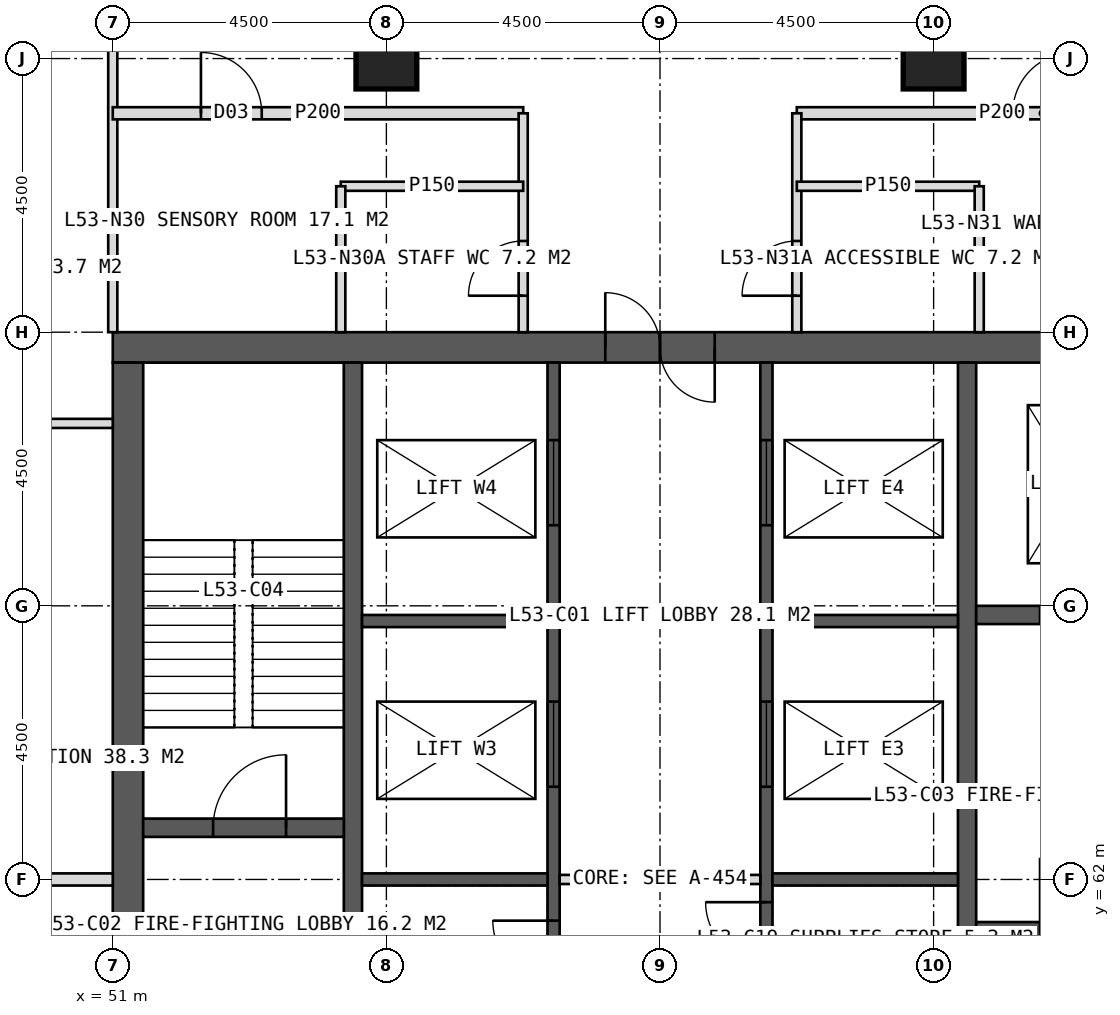
"""IFC4 building model, lengths in metres.
Left out: names, types, materials, properties, quantities, classifications, styles, units other than length and angle.
Written with IfcOpenShell. Run it as: python <this file> out.ifc"""

import sys

from ifc_helpers import new_model, si_unit, direction, frame, frame_2d, origin, origin_2d, place, context, subcontext, project, spatial, rectangle, hollow_rectangle, extrude, element, fill, save


model = new_model("IFC4")
c1 = context("Model", 3, precision=1e-05, world=origin(), true_north=direction((0.0, 1.0)))
c2 = subcontext(c1, "Body", "Model", "MODEL_VIEW")
j1 = project(units=[si_unit("LENGTHUNIT", "METRE"), si_unit("PLANEANGLEUNIT", "RADIAN")], contexts=[c1])
p1 = place(None, origin())
s1 = spatial("IfcSite", under=j1, at=p1, CompositionType="ELEMENT")
p2 = place(p1, origin())
s2 = spatial("IfcBuilding", under=s1, at=p2, CompositionType="ELEMENT")
p3 = place(p2, frame((0.0, 0.0, 221.0)))
s3 = spatial("IfcBuildingStorey", under=s2, at=p3, CompositionType="ELEMENT", Elevation=221.0)
p4 = place(p3, frame((51.0, 70.75, 0.0), z_axis=(0.0, 0.0, 1.0), x_axis=(1.0, 0.0, 0.0)))
e1 = element("IfcWall", 1, at=p4, inside=s3, PredefinedType="SHEAR", context=c2, shape_type="SweptSolid", body=[
    extrude(rectangle(XDim=18.0, YDim=0.5, at=frame_2d((9.0, 0.0))), origin(), (0.0, 0.0, 1.0), 4.0),
])
p5 = place(p4, frame((8.1, 0.0, 0.0)))
e2 = element("IfcOpeningElement", 2, at=p5, cuts=e1, PredefinedType="OPENING", context=c2, shape_type="SweptSolid", body=[
    extrude(rectangle(XDim=1.8, YDim=2.2, at=frame_2d((0.9, 1.1))), frame((0.0, 0.26, 0.0), z_axis=(0.0, -1.0, 0.0), x_axis=(1.0, 0.0, 0.0)), (0.0, 0.0, 1.0), 0.52),
])
p6 = place(p3, frame((51.25, 53.5, 0.0), z_axis=(0.0, 0.0, 1.0), x_axis=(0.0, 1.0, 0.0)))
e3 = element("IfcWall", 3, at=p6, inside=s3, PredefinedType="SHEAR", context=c2, shape_type="SweptSolid", body=[
    extrude(rectangle(XDim=17.0, YDim=0.5, at=frame_2d((8.5, 0.0))), origin(), (0.0, 0.0, 1.0), 4.0),
])
p7 = place(p6, frame((6.1, 0.0, 0.0)))
e4 = element("IfcOpeningElement", 4, at=p7, cuts=e3, PredefinedType="OPENING", context=c2, shape_type="SweptSolid", body=[
    extrude(rectangle(XDim=1.5, YDim=2.2, at=frame_2d((0.75, 1.1))), frame((0.0, 0.26, 0.0), z_axis=(0.0, -1.0, 0.0), x_axis=(1.0, 0.0, 0.0)), (0.0, 0.0, 1.0), 0.52),
])
for number, where, z_axis, x_axis in (
    (5, (54.95, 53.5, 0.0), (0.0, 0.0, 1.0), (0.0, 1.0, 0.0)),
    (6, (65.05, 53.5, 0.0), (0.0, 0.0, 1.0), (0.0, 1.0, 0.0)),
):
    element("IfcWall", number, at=place(p3, frame(where, z_axis=z_axis, x_axis=x_axis)), inside=s3, PredefinedType="SHEAR", context=c2, shape_type="SweptSolid", body=[
        extrude(rectangle(XDim=17.0, YDim=0.3, at=frame_2d((8.5, 0.0))), origin(), (0.0, 0.0, 1.0), 4.0),
    ])
p8 = place(p3, frame((58.25, 53.5, 0.0), z_axis=(0.0, 0.0, 1.0), x_axis=(0.0, 1.0, 0.0)))
e7 = element("IfcWall", 7, at=p8, inside=s3, PredefinedType="SHEAR", context=c2, shape_type="SweptSolid", body=[
    extrude(rectangle(XDim=17.0, YDim=0.2, at=frame_2d((8.5, 0.0))), origin(), (0.0, 0.0, 1.0), 4.0),
])
p9 = place(p8, frame((0.808, 0.0, 0.0)))
e8 = element("IfcOpeningElement", 8, at=p9, cuts=e7, PredefinedType="OPENING", context=c2, shape_type="SweptSolid", body=[
    extrude(rectangle(XDim=1.0, YDim=2.1, at=frame_2d((0.5, 1.05))), frame((0.0, 0.11, 0.0), z_axis=(0.0, -1.0, 0.0), x_axis=(1.0, 0.0, 0.0)), (0.0, 0.0, 1.0), 0.22),
])
p10 = place(p8, frame((2.958, 0.0, 0.0)))
e9 = element("IfcOpeningElement", 9, at=p10, cuts=e7, PredefinedType="OPENING", context=c2, shape_type="SweptSolid", body=[
    extrude(rectangle(XDim=1.0, YDim=2.1, at=frame_2d((0.5, 1.05))), frame((0.0, 0.11, 0.0), z_axis=(0.0, -1.0, 0.0), x_axis=(1.0, 0.0, 0.0)), (0.0, 0.0, 1.0), 0.22),
])
p11 = place(p8, frame((4.722, 0.0, 0.0)))
e10 = element("IfcOpeningElement", 10, at=p11, cuts=e7, PredefinedType="OPENING", context=c2, shape_type="SweptSolid", body=[
    extrude(rectangle(XDim=1.0, YDim=2.1, at=frame_2d((0.5, 1.05))), frame((0.0, 0.11, 0.0), z_axis=(0.0, -1.0, 0.0), x_axis=(1.0, 0.0, 0.0)), (0.0, 0.0, 1.0), 0.22),
])
p12 = place(p8, frame((6.823, 0.0, 0.0)))
e11 = element("IfcOpeningElement", 11, at=p12, cuts=e7, PredefinedType="OPENING", context=c2, shape_type="SweptSolid", body=[
    extrude(rectangle(XDim=1.0, YDim=2.1, at=frame_2d((0.5, 1.05))), frame((0.0, 0.11, 0.0), z_axis=(0.0, -1.0, 0.0), x_axis=(1.0, 0.0, 0.0)), (0.0, 0.0, 1.0), 0.22),
])
p13 = place(p8, frame((10.025, 0.0, 0.0)))
e12 = element("IfcOpeningElement", 12, at=p13, cuts=e7, PredefinedType="OPENING", context=c2, shape_type="SweptSolid", body=[
    extrude(rectangle(XDim=1.4, YDim=2.2, at=frame_2d((0.7, 1.1))), frame((0.0, 0.11, 0.0), z_axis=(0.0, -1.0, 0.0), x_axis=(1.0, 0.0, 0.0)), (0.0, 0.0, 1.0), 0.22),
])
p14 = place(p8, frame((14.325, 0.0, 0.0)))
e13 = element("IfcOpeningElement", 13, at=p14, cuts=e7, PredefinedType="OPENING", context=c2, shape_type="SweptSolid", body=[
    extrude(rectangle(XDim=1.4, YDim=2.2, at=frame_2d((0.7, 1.1))), frame((0.0, 0.11, 0.0), z_axis=(0.0, -1.0, 0.0), x_axis=(1.0, 0.0, 0.0)), (0.0, 0.0, 1.0), 0.22),
])
p15 = place(p3, frame((61.75, 53.5, 0.0), z_axis=(0.0, 0.0, 1.0), x_axis=(0.0, 1.0, 0.0)))
e14 = element("IfcWall", 14, at=p15, inside=s3, PredefinedType="SHEAR", context=c2, shape_type="SweptSolid", body=[
    extrude(rectangle(XDim=17.0, YDim=0.2, at=frame_2d((8.5, 0.0))), origin(), (0.0, 0.0, 1.0), 4.0),
])
p16 = place(p15, frame((0.496, 0.0, 0.0)))
e15 = element("IfcOpeningElement", 15, at=p16, cuts=e14, PredefinedType="OPENING", context=c2, shape_type="SweptSolid", body=[
    extrude(rectangle(XDim=1.0, YDim=2.1, at=frame_2d((0.5, 1.05))), frame((0.0, 0.11, 0.0), z_axis=(0.0, -1.0, 0.0), x_axis=(1.0, 0.0, 0.0)), (0.0, 0.0, 1.0), 0.22),
])
p17 = place(p15, frame((2.646, 0.0, 0.0)))
e16 = element("IfcOpeningElement", 16, at=p17, cuts=e14, PredefinedType="OPENING", context=c2, shape_type="SweptSolid", body=[
    extrude(rectangle(XDim=1.0, YDim=2.1, at=frame_2d((0.5, 1.05))), frame((0.0, 0.11, 0.0), z_axis=(0.0, -1.0, 0.0), x_axis=(1.0, 0.0, 0.0)), (0.0, 0.0, 1.0), 0.22),
])
p18 = place(p15, frame((5.027, 0.0, 0.0)))
e17 = element("IfcOpeningElement", 17, at=p18, cuts=e14, PredefinedType="OPENING", context=c2, shape_type="SweptSolid", body=[
    extrude(rectangle(XDim=1.0, YDim=2.1, at=frame_2d((0.5, 1.05))), frame((0.0, 0.11, 0.0), z_axis=(0.0, -1.0, 0.0), x_axis=(1.0, 0.0, 0.0)), (0.0, 0.0, 1.0), 0.22),
])
p19 = place(p15, frame((7.126, 0.0, 0.0)))
e18 = element("IfcOpeningElement", 18, at=p19, cuts=e14, PredefinedType="OPENING", context=c2, shape_type="SweptSolid", body=[
    extrude(rectangle(XDim=1.0, YDim=2.1, at=frame_2d((0.5, 1.05))), frame((0.0, 0.11, 0.0), z_axis=(0.0, -1.0, 0.0), x_axis=(1.0, 0.0, 0.0)), (0.0, 0.0, 1.0), 0.22),
])
p20 = place(p15, frame((10.025, 0.0, 0.0)))
e19 = element("IfcOpeningElement", 19, at=p20, cuts=e14, PredefinedType="OPENING", context=c2, shape_type="SweptSolid", body=[
    extrude(rectangle(XDim=1.4, YDim=2.2, at=frame_2d((0.7, 1.1))), frame((0.0, 0.11, 0.0), z_axis=(0.0, -1.0, 0.0), x_axis=(1.0, 0.0, 0.0)), (0.0, 0.0, 1.0), 0.22),
])
p21 = place(p15, frame((14.325, 0.0, 0.0)))
e20 = element("IfcOpeningElement", 20, at=p21, cuts=e14, PredefinedType="OPENING", context=c2, shape_type="SweptSolid", body=[
    extrude(rectangle(XDim=1.4, YDim=2.2, at=frame_2d((0.7, 1.1))), frame((0.0, 0.11, 0.0), z_axis=(0.0, -1.0, 0.0), x_axis=(1.0, 0.0, 0.0)), (0.0, 0.0, 1.0), 0.22),
])
for number, where, z_axis, x_axis in (
    (21, (55.1, 62.0, 0.0), (0.0, 0.0, 1.0), (1.0, 0.0, 0.0)),
    (22, (61.85, 62.0, 0.0), (0.0, 0.0, 1.0), (1.0, 0.0, 0.0)),
    (23, (55.1, 66.25, 0.0), (0.0, 0.0, 1.0), (1.0, 0.0, 0.0)),
    (24, (61.85, 66.25, 0.0), (0.0, 0.0, 1.0), (1.0, 0.0, 0.0)),
):
    element("IfcWall", number, at=place(p3, frame(where, z_axis=z_axis, x_axis=x_axis)), inside=s3, PredefinedType="SHEAR", context=c2, shape_type="SweptSolid", body=[
        extrude(rectangle(XDim=3.05, YDim=0.2, at=frame_2d((1.525, 0.0))), origin(), (0.0, 0.0, 1.0), 4.0),
    ])
p22 = place(p3, frame((51.5, 62.85, 0.0), z_axis=(0.0, 0.0, 1.0), x_axis=(1.0, 0.0, 0.0)))
e25 = element("IfcWall", 25, at=p22, inside=s3, PredefinedType="SHEAR", context=c2, shape_type="SweptSolid", body=[
    extrude(rectangle(XDim=3.3, YDim=0.3, at=frame_2d((1.65, 0.0))), origin(), (0.0, 0.0, 1.0), 4.0),
])
p23 = place(p22, frame((1.15, 0.0, 0.0)))
e26 = element("IfcOpeningElement", 26, at=p23, cuts=e25, PredefinedType="OPENING", context=c2, shape_type="SweptSolid", body=[
    extrude(rectangle(XDim=1.2, YDim=2.1, at=frame_2d((0.6, 1.05))), frame((0.0, 0.16, 0.0), z_axis=(0.0, -1.0, 0.0), x_axis=(1.0, 0.0, 0.0)), (0.0, 0.0, 1.0), 0.32),
])
p24 = place(p3, frame((65.2, 61.15, 0.0), z_axis=(0.0, 0.0, 1.0), x_axis=(1.0, 0.0, 0.0)))
e27 = element("IfcWall", 27, at=p24, inside=s3, PredefinedType="SHEAR", context=c2, shape_type="SweptSolid", body=[
    extrude(rectangle(XDim=3.3, YDim=0.3, at=frame_2d((1.65, 0.0))), origin(), (0.0, 0.0, 1.0), 4.0),
])
p25 = place(p24, frame((1.05, 0.0, 0.0)))
e28 = element("IfcOpeningElement", 28, at=p25, cuts=e27, PredefinedType="OPENING", context=c2, shape_type="SweptSolid", body=[
    extrude(rectangle(XDim=1.2, YDim=2.1, at=frame_2d((0.6, 1.05))), frame((0.0, 0.16, 0.0), z_axis=(0.0, -1.0, 0.0), x_axis=(1.0, 0.0, 0.0)), (0.0, 0.0, 1.0), 0.32),
])
p26 = place(p3, frame((65.2, 66.35, 0.0), z_axis=(0.0, 0.0, 1.0), x_axis=(1.0, 0.0, 0.0)))
e29 = element("IfcWall", 29, at=p26, inside=s3, PredefinedType="SHEAR", context=c2, shape_type="SweptSolid", body=[
    extrude(rectangle(XDim=3.3, YDim=0.3, at=frame_2d((1.65, 0.0))), origin(), (0.0, 0.0, 1.0), 4.0),
])
p27 = place(p26, frame((1.05, 0.0, 0.0)))
e30 = element("IfcOpeningElement", 30, at=p27, cuts=e29, PredefinedType="OPENING", context=c2, shape_type="SweptSolid", body=[
    extrude(rectangle(XDim=1.2, YDim=2.2, at=frame_2d((0.6, 1.1))), frame((0.0, 0.16, 0.0), z_axis=(0.0, -1.0, 0.0), x_axis=(1.0, 0.0, 0.0)), (0.0, 0.0, 1.0), 0.32),
])
for number, where, z_axis, x_axis in (
    (31, (55.5, 75.5, 0.0), (0.0, 0.0, 1.0), (1.0, 0.0, 0.0)),
    (32, (64.5, 75.5, 0.0), (0.0, 0.0, 1.0), (1.0, 0.0, 0.0)),
):
    element("IfcColumn", number, at=place(p3, frame(where, z_axis=z_axis, x_axis=x_axis)), inside=s3, PredefinedType="COLUMN", context=c2, shape_type="SweptSolid", body=[
        extrude(hollow_rectangle(XDim=1.0, YDim=1.0, WallThickness=0.1, at=origin_2d()), origin(), (0.0, 0.0, 1.0), 4.0),
    ])
p28 = place(p3, frame((51.0, 71.0, 0.0), z_axis=(0.0, 0.0, 1.0), x_axis=(0.0, 1.0, 0.0)))
e33 = element("IfcWall", 33, at=p28, inside=s3, PredefinedType="PARTITIONING", context=c2, shape_type="SweptSolid", body=[
    extrude(rectangle(XDim=5.1, YDim=0.15, at=frame_2d((2.55, 0.0))), origin(), (0.0, 0.0, 1.0), 3.75),
])
p29 = place(p3, frame((51.0, 74.6, 0.0), z_axis=(0.0, 0.0, 1.0), x_axis=(1.0, 0.0, 0.0)))
e34 = element("IfcWall", 34, at=p29, inside=s3, PredefinedType="PARTITIONING", context=c2, shape_type="SweptSolid", body=[
    extrude(rectangle(XDim=6.75, YDim=0.2, at=frame_2d((3.375, 0.0))), origin(), (0.0, 0.0, 1.0), 3.75),
])
p30 = place(p29, frame((1.45, 0.0, 0.0)))
e35 = element("IfcOpeningElement", 35, at=p30, cuts=e34, PredefinedType="OPENING", context=c2, shape_type="SweptSolid", body=[
    extrude(rectangle(XDim=1.0, YDim=2.1, at=frame_2d((0.5, 1.05))), frame((0.0, 0.11, 0.0), z_axis=(0.0, -1.0, 0.0), x_axis=(1.0, 0.0, 0.0)), (0.0, 0.0, 1.0), 0.22),
])
p31 = place(p3, frame((62.25, 74.6, 0.0), z_axis=(0.0, 0.0, 1.0), x_axis=(1.0, 0.0, 0.0)))
e36 = element("IfcWall", 36, at=p31, inside=s3, PredefinedType="PARTITIONING", context=c2, shape_type="SweptSolid", body=[
    extrude(rectangle(XDim=6.75, YDim=0.2, at=frame_2d((3.375, 0.0))), origin(), (0.0, 0.0, 1.0), 3.75),
])
p32 = place(p31, frame((3.55, 0.0, 0.0)))
e37 = element("IfcOpeningElement", 37, at=p32, cuts=e36, PredefinedType="OPENING", context=c2, shape_type="SweptSolid", body=[
    extrude(rectangle(XDim=1.0, YDim=2.1, at=frame_2d((0.5, 1.05))), frame((0.0, 0.11, 0.0), z_axis=(0.0, -1.0, 0.0), x_axis=(1.0, 0.0, 0.0)), (0.0, 0.0, 1.0), 0.22),
])
p33 = place(p3, frame((57.75, 71.0, 0.0), z_axis=(0.0, 0.0, 1.0), x_axis=(0.0, 1.0, 0.0)))
e38 = element("IfcWall", 38, at=p33, inside=s3, PredefinedType="PARTITIONING", context=c2, shape_type="SweptSolid", body=[
    extrude(rectangle(XDim=3.6, YDim=0.15, at=frame_2d((1.8, 0.0))), origin(), (0.0, 0.0, 1.0), 3.75),
])
p34 = place(p33, frame((0.6, 0.0, 0.0)))
e39 = element("IfcOpeningElement", 39, at=p34, cuts=e38, PredefinedType="OPENING", context=c2, shape_type="SweptSolid", body=[
    extrude(rectangle(XDim=0.9, YDim=2.1, at=frame_2d((0.45, 1.05))), frame((0.0, 0.085, 0.0), z_axis=(0.0, -1.0, 0.0), x_axis=(1.0, 0.0, 0.0)), (0.0, 0.0, 1.0), 0.17),
])
p35 = place(p3, frame((62.25, 71.0, 0.0), z_axis=(0.0, 0.0, 1.0), x_axis=(0.0, 1.0, 0.0)))
e40 = element("IfcWall", 40, at=p35, inside=s3, PredefinedType="PARTITIONING", context=c2, shape_type="SweptSolid", body=[
    extrude(rectangle(XDim=3.6, YDim=0.15, at=frame_2d((1.8, 0.0))), origin(), (0.0, 0.0, 1.0), 3.75),
])
p36 = place(p35, frame((0.6, 0.0, 0.0)))
e41 = element("IfcOpeningElement", 41, at=p36, cuts=e40, PredefinedType="OPENING", context=c2, shape_type="SweptSolid", body=[
    extrude(rectangle(XDim=0.9, YDim=2.1, at=frame_2d((0.45, 1.05))), frame((0.0, 0.085, 0.0), z_axis=(0.0, -1.0, 0.0), x_axis=(1.0, 0.0, 0.0)), (0.0, 0.0, 1.0), 0.17),
])
p37 = place(p3, frame((54.75, 73.4, 0.0), z_axis=(0.0, 0.0, 1.0), x_axis=(1.0, 0.0, 0.0)))
e42 = element("IfcWall", 42, at=p37, inside=s3, PredefinedType="PARTITIONING", context=c2, shape_type="SweptSolid", body=[
    extrude(rectangle(XDim=3.0, YDim=0.15, at=frame_2d((1.5, 0.0))), origin(), (0.0, 0.0, 1.0), 3.75),
])
p38 = place(p3, frame((54.75, 71.0, 0.0), z_axis=(0.0, 0.0, 1.0), x_axis=(0.0, 1.0, 0.0)))
e43 = element("IfcWall", 43, at=p38, inside=s3, PredefinedType="PARTITIONING", context=c2, shape_type="SweptSolid", body=[
    extrude(rectangle(XDim=2.4, YDim=0.15, at=frame_2d((1.2, 0.0))), origin(), (0.0, 0.0, 1.0), 3.75),
])
p39 = place(p3, frame((62.25, 73.4, 0.0), z_axis=(0.0, 0.0, 1.0), x_axis=(1.0, 0.0, 0.0)))
e44 = element("IfcWall", 44, at=p39, inside=s3, PredefinedType="PARTITIONING", context=c2, shape_type="SweptSolid", body=[
    extrude(rectangle(XDim=3.0, YDim=0.15, at=frame_2d((1.5, 0.0))), origin(), (0.0, 0.0, 1.0), 3.75),
])
p40 = place(p3, frame((65.25, 71.0, 0.0), z_axis=(0.0, 0.0, 1.0), x_axis=(0.0, 1.0, 0.0)))
e45 = element("IfcWall", 45, at=p40, inside=s3, PredefinedType="PARTITIONING", context=c2, shape_type="SweptSolid", body=[
    extrude(rectangle(XDim=2.4, YDim=0.15, at=frame_2d((1.2, 0.0))), origin(), (0.0, 0.0, 1.0), 3.75),
])
p41 = place(p3, frame((51.0, 62.0, 0.0), z_axis=(0.0, 0.0, 1.0), x_axis=(-1.0, 0.0, 0.0)))
e46 = element("IfcWall", 46, at=p41, inside=s3, PredefinedType="SOLIDWALL", context=c2, shape_type="SweptSolid", body=[
    extrude(rectangle(XDim=5.1, YDim=0.2, at=frame_2d((2.55, 0.0))), origin(), (0.0, 0.0, 1.0), 2.95),
])
p42 = place(p3, frame((51.0, 69.5, 0.0), z_axis=(0.0, 0.0, 1.0), x_axis=(-1.0, 0.0, 0.0)))
e47 = element("IfcWall", 47, at=p42, inside=s3, PredefinedType="PARTITIONING", context=c2, shape_type="SweptSolid", body=[
    extrude(rectangle(XDim=5.1, YDim=0.15, at=frame_2d((2.55, 0.0))), origin(), (0.0, 0.0, 1.0), 3.75),
])
p43 = place(p3, frame((58.35, 62.0, 0.0), z_axis=(0.0, 0.0, 1.0), x_axis=(1.0, 0.0, 0.0)))
e48 = element("IfcWall", 48, at=p43, inside=s3, PredefinedType="PARTITIONING", context=c2, shape_type="SweptSolid", body=[
    extrude(rectangle(XDim=3.3, YDim=0.15, at=frame_2d((1.65, 0.0))), origin(), (0.0, 0.0, 1.0), 3.75),
])
p44 = place(p34, origin())
e49 = element("IfcDoor", 49, at=p44, inside=s3, OperationType="SINGLE_SWING_LEFT", PredefinedType="DOOR", context=c2, shape_type="SweptSolid", body=[
    extrude(rectangle(XDim=0.9, YDim=2.1, at=frame_2d((0.45, 1.05))), frame((0.0, 0.025, 0.0), z_axis=(0.0, -1.0, 0.0), x_axis=(1.0, 0.0, 0.0)), (0.0, 0.0, 1.0), 0.05),
])
fill(e39, e49)
p45 = place(p30, origin())
e50 = element("IfcDoor", 50, at=p45, inside=s3, OperationType="SINGLE_SWING_LEFT", PredefinedType="DOOR", context=c2, shape_type="SweptSolid", body=[
    extrude(rectangle(XDim=1.0, YDim=2.1, at=frame_2d((0.5, 1.05))), frame((0.0, 0.025, 0.0), z_axis=(0.0, -1.0, 0.0), x_axis=(1.0, 0.0, 0.0)), (0.0, 0.0, 1.0), 0.05),
])
fill(e35, e50)
p46 = place(p36, origin())
e51 = element("IfcDoor", 51, at=p46, inside=s3, OperationType="SINGLE_SWING_LEFT", PredefinedType="DOOR", context=c2, shape_type="SweptSolid", body=[
    extrude(rectangle(XDim=0.9, YDim=2.1, at=frame_2d((0.45, 1.05))), frame((0.0, 0.025, 0.0), z_axis=(0.0, -1.0, 0.0), x_axis=(1.0, 0.0, 0.0)), (0.0, 0.0, 1.0), 0.05),
])
fill(e41, e51)
p47 = place(p32, origin())
e52 = element("IfcDoor", 52, at=p47, inside=s3, OperationType="SINGLE_SWING_RIGHT", PredefinedType="DOOR", context=c2, shape_type="SweptSolid", body=[
    extrude(rectangle(XDim=1.0, YDim=2.1, at=frame_2d((0.5, 1.05))), frame((0.0, 0.025, 0.0), z_axis=(0.0, -1.0, 0.0), x_axis=(1.0, 0.0, 0.0)), (0.0, 0.0, 1.0), 0.05),
])
fill(e37, e52)
p48 = place(p5, origin())
e53 = element("IfcDoor", 53, at=p48, inside=s3, OperationType="DOUBLE_DOOR_SINGLE_SWING", PredefinedType="DOOR", context=c2, shape_type="SweptSolid", body=[
    extrude(rectangle(XDim=1.8, YDim=2.2, at=frame_2d((0.9, 1.1))), frame((0.0, 0.025, 0.0), z_axis=(0.0, -1.0, 0.0), x_axis=(1.0, 0.0, 0.0)), (0.0, 0.0, 1.0), 0.05),
])
fill(e2, e53)
p49 = place(p7, origin())
e54 = element("IfcDoor", 54, at=p49, inside=s3, OperationType="DOUBLE_DOOR_SINGLE_SWING", PredefinedType="DOOR", context=c2, shape_type="SweptSolid", body=[
    extrude(rectangle(XDim=1.5, YDim=2.2, at=frame_2d((0.75, 1.1))), frame((0.0, 0.025, 0.0), z_axis=(0.0, -1.0, 0.0), x_axis=(1.0, 0.0, 0.0)), (0.0, 0.0, 1.0), 0.05),
])
fill(e4, e54)
p50 = place(p23, origin())
e55 = element("IfcDoor", 55, at=p50, inside=s3, OperationType="SINGLE_SWING_RIGHT", PredefinedType="DOOR", context=c2, shape_type="SweptSolid", body=[
    extrude(rectangle(XDim=1.2, YDim=2.1, at=frame_2d((0.6, 1.05))), frame((0.0, 0.025, 0.0), z_axis=(0.0, -1.0, 0.0), x_axis=(1.0, 0.0, 0.0)), (0.0, 0.0, 1.0), 0.05),
])
fill(e26, e55)
p51 = place(p12, origin())
e56 = element("IfcDoor", 56, at=p51, inside=s3, OperationType="SINGLE_SWING_RIGHT", PredefinedType="DOOR", context=c2, shape_type="SweptSolid", body=[
    extrude(rectangle(XDim=1.0, YDim=2.1, at=frame_2d((0.5, 1.05))), frame((0.0, 0.025, 0.0), z_axis=(0.0, -1.0, 0.0), x_axis=(1.0, 0.0, 0.0)), (0.0, 0.0, 1.0), 0.05),
])
fill(e11, e56)
p52 = place(p19, origin())
e57 = element("IfcDoor", 57, at=p52, inside=s3, OperationType="SINGLE_SWING_RIGHT", PredefinedType="DOOR", context=c2, shape_type="SweptSolid", body=[
    extrude(rectangle(XDim=1.0, YDim=2.1, at=frame_2d((0.5, 1.05))), frame((0.0, 0.025, 0.0), z_axis=(0.0, -1.0, 0.0), x_axis=(1.0, 0.0, 0.0)), (0.0, 0.0, 1.0), 0.05),
])
fill(e18, e57)
p53 = place(p13, origin())
e58 = element("IfcDoor", 58, at=p53, inside=s3, OperationType="SLIDING_TO_LEFT", PredefinedType="DOOR", context=c2, shape_type="SweptSolid", body=[
    extrude(rectangle(XDim=1.4, YDim=2.2, at=frame_2d((0.7, 1.1))), frame((0.0, 0.025, 0.0), z_axis=(0.0, -1.0, 0.0), x_axis=(1.0, 0.0, 0.0)), (0.0, 0.0, 1.0), 0.05),
])
fill(e12, e58)
p54 = place(p20, origin())
e59 = element("IfcDoor", 59, at=p54, inside=s3, OperationType="SLIDING_TO_LEFT", PredefinedType="DOOR", context=c2, shape_type="SweptSolid", body=[
    extrude(rectangle(XDim=1.4, YDim=2.2, at=frame_2d((0.7, 1.1))), frame((0.0, 0.025, 0.0), z_axis=(0.0, -1.0, 0.0), x_axis=(1.0, 0.0, 0.0)), (0.0, 0.0, 1.0), 0.05),
])
fill(e19, e59)
p55 = place(p14, origin())
e60 = element("IfcDoor", 60, at=p55, inside=s3, OperationType="SLIDING_TO_LEFT", PredefinedType="DOOR", context=c2, shape_type="SweptSolid", body=[
    extrude(rectangle(XDim=1.4, YDim=2.2, at=frame_2d((0.7, 1.1))), frame((0.0, 0.025, 0.0), z_axis=(0.0, -1.0, 0.0), x_axis=(1.0, 0.0, 0.0)), (0.0, 0.0, 1.0), 0.05),
])
fill(e13, e60)
p56 = place(p21, origin())
e61 = element("IfcDoor", 61, at=p56, inside=s3, OperationType="SLIDING_TO_LEFT", PredefinedType="DOOR", context=c2, shape_type="SweptSolid", body=[
    extrude(rectangle(XDim=1.4, YDim=2.2, at=frame_2d((0.7, 1.1))), frame((0.0, 0.025, 0.0), z_axis=(0.0, -1.0, 0.0), x_axis=(1.0, 0.0, 0.0)), (0.0, 0.0, 1.0), 0.05),
])
fill(e20, e61)
save(model, sys.argv[1])
